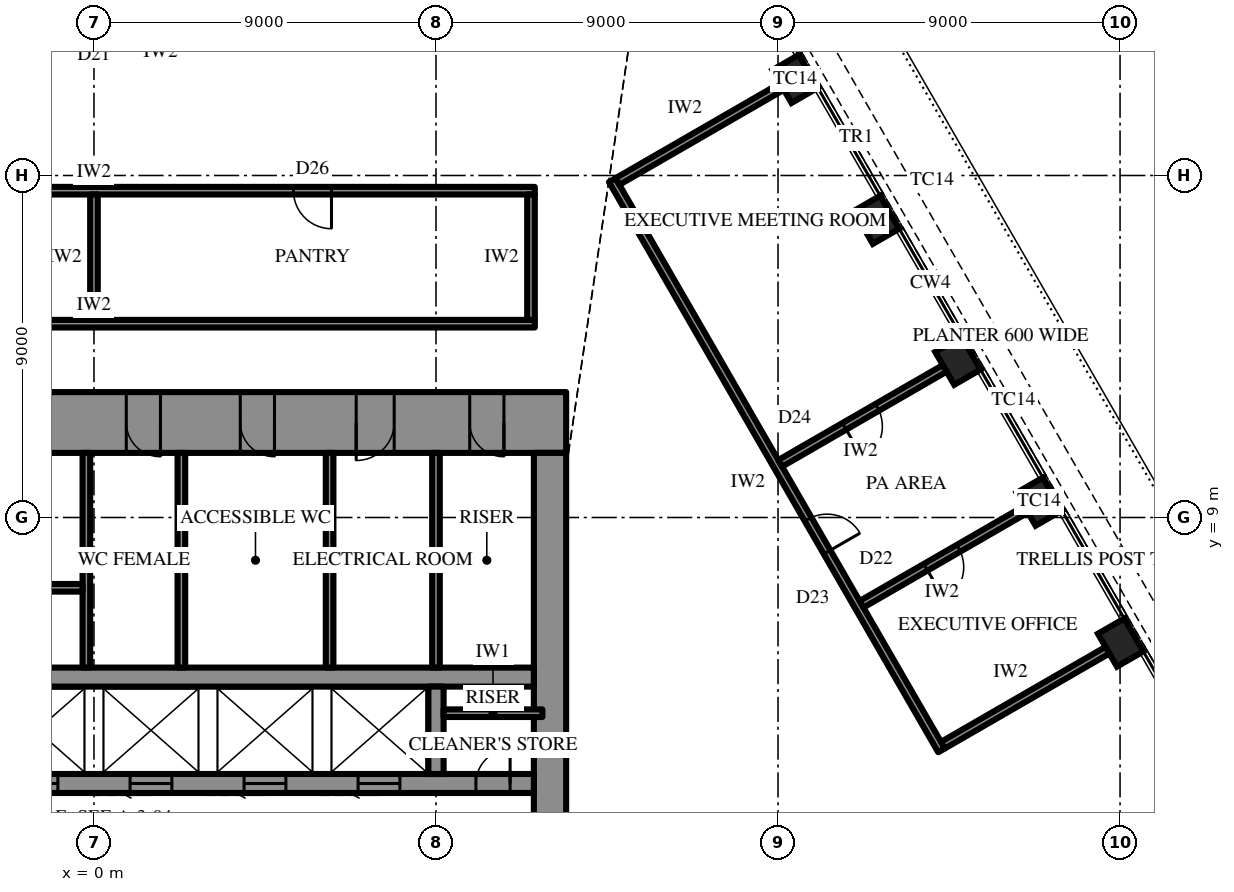
"""IFC4 building model, lengths in metres.
Left out: names, types, materials, properties, quantities, classifications, styles, units other than length and angle.
Written with IfcOpenShell. Run it as: python <this file> out.ifc"""

import sys

from ifc_helpers import new_model, si_unit, direction, frame, frame_2d, origin, origin_2d, place, context, subcontext, project, spatial, rectangle, extrude, element, fill, save


model = new_model("IFC4")
c1 = context("Model", 3, precision=1e-05, world=origin(), true_north=direction((0.0, 1.0)))
c2 = subcontext(c1, "Body", "Model", "MODEL_VIEW")
j1 = project(units=[si_unit("LENGTHUNIT", "METRE"), si_unit("PLANEANGLEUNIT", "RADIAN")], contexts=[c1])
p1 = place(None, origin())
s1 = spatial("IfcSite", under=j1, at=p1, CompositionType="ELEMENT")
p2 = place(p1, origin())
s2 = spatial("IfcBuilding", under=s1, at=p2, CompositionType="ELEMENT")
p3 = place(p2, frame((0.0, 0.0, 345.1)))
s3 = spatial("IfcBuildingStorey", under=s2, at=p3, CompositionType="ELEMENT", Elevation=345.1)
for number, where, z_axis, x_axis in (
    (1, (27.015, 5.708, 0.0), (0.0, 0.0, 1.0), (-0.5, 0.866, 0.0)),
    (2, (24.874, 9.417, 0.0), (0.0, 0.0, 1.0), (-0.5, 0.866, 0.0)),
    (3, (22.733, 13.125, 0.0), (0.0, 0.0, 1.0), (-0.5, 0.866, 0.0)),
    (4, (20.592, 16.833, 0.0), (0.0, 0.0, 1.0), (-0.5, 0.866, 0.0)),
    (5, (18.451, 20.542, 0.0), (0.0, 0.0, 1.0), (-0.5, 0.866, 0.0)),
):
    element("IfcColumn", number, at=place(p3, frame(where, z_axis=z_axis, x_axis=x_axis)), inside=s3, PredefinedType="COLUMN", context=c2, shape_type="SweptSolid", body=[
        extrude(rectangle(XDim=1.0, YDim=0.8, at=origin_2d()), origin(), (0.0, 0.0, 1.0), 4.2),
    ])
p4 = place(p3, frame((-12.425, 11.5, 0.0), z_axis=(0.0, 0.0, 1.0), x_axis=(1.0, 0.0, 0.0)))
e6 = element("IfcWall", 6, at=p4, inside=s3, PredefinedType="SHEAR", context=c2, shape_type="SweptSolid", body=[
    extrude(rectangle(XDim=24.85, YDim=1.6, at=frame_2d((12.425, 0.0))), origin(), (0.0, 0.0, 1.0), 4.2),
])
p5 = place(p4, frame((13.275, 0.0, 0.0)))
e7 = element("IfcOpeningElement", 7, at=p5, cuts=e6, PredefinedType="OPENING", context=c2, shape_type="SweptSolid", body=[
    extrude(rectangle(XDim=0.9, YDim=2.2, at=frame_2d((0.45, 1.1))), frame((0.0, 0.81, 0.0), z_axis=(0.0, -1.0, 0.0), x_axis=(1.0, 0.0, 0.0)), (0.0, 0.0, 1.0), 1.62),
])
p6 = place(p4, frame((16.275, 0.0, 0.0)))
e8 = element("IfcOpeningElement", 8, at=p6, cuts=e6, PredefinedType="OPENING", context=c2, shape_type="SweptSolid", body=[
    extrude(rectangle(XDim=0.9, YDim=2.2, at=frame_2d((0.45, 1.1))), frame((0.0, 0.81, 0.0), z_axis=(0.0, -1.0, 0.0), x_axis=(1.0, 0.0, 0.0)), (0.0, 0.0, 1.0), 1.62),
])
p7 = place(p4, frame((19.325, 0.0, 0.0)))
e9 = element("IfcOpeningElement", 9, at=p7, cuts=e6, PredefinedType="OPENING", context=c2, shape_type="SweptSolid", body=[
    extrude(rectangle(XDim=1.0, YDim=2.2, at=frame_2d((0.5, 1.1))), frame((0.0, 0.81, 0.0), z_axis=(0.0, -1.0, 0.0), x_axis=(1.0, 0.0, 0.0)), (0.0, 0.0, 1.0), 1.62),
])
p8 = place(p4, frame((1.637, 0.0, 0.0)))
e10 = element("IfcOpeningElement", 10, at=p8, cuts=e6, PredefinedType="OPENING", context=c2, shape_type="SweptSolid", body=[
    extrude(rectangle(XDim=0.9, YDim=2.2, at=frame_2d((0.45, 1.1))), frame((0.0, 0.81, 0.0), z_axis=(0.0, -1.0, 0.0), x_axis=(1.0, 0.0, 0.0)), (0.0, 0.0, 1.0), 1.62),
])
p9 = place(p4, frame((22.312, 0.0, 0.0)))
e11 = element("IfcOpeningElement", 11, at=p9, cuts=e6, PredefinedType="OPENING", context=c2, shape_type="SweptSolid", body=[
    extrude(rectangle(XDim=0.9, YDim=2.2, at=frame_2d((0.45, 1.1))), frame((0.0, 0.81, 0.0), z_axis=(0.0, -1.0, 0.0), x_axis=(1.0, 0.0, 0.0)), (0.0, 0.0, 1.0), 1.62),
])
p10 = place(p3, frame((12.0, -10.7, 0.0), z_axis=(0.0, 0.0, 1.0), x_axis=(0.0, 1.0, 0.0)))
e12 = element("IfcWall", 12, at=p10, inside=s3, PredefinedType="SHEAR", context=c2, shape_type="SweptSolid", body=[
    extrude(rectangle(XDim=21.4, YDim=0.85, at=frame_2d((10.7, 0.0))), origin(), (0.0, 0.0, 1.0), 4.2),
])
p11 = place(p10, frame((9.8, 0.0, 0.0)))
e13 = element("IfcOpeningElement", 13, at=p11, cuts=e12, PredefinedType="OPENING", context=c2, shape_type="SweptSolid", body=[
    extrude(rectangle(XDim=1.8, YDim=2.4, at=frame_2d((0.9, 1.2))), frame((0.0, 0.435, 0.0), z_axis=(0.0, -1.0, 0.0), x_axis=(1.0, 0.0, 0.0)), (0.0, 0.0, 1.0), 0.87),
])
p12 = place(p3, frame((-3.2, 2.0, 0.0), z_axis=(0.0, 0.0, 1.0), x_axis=(1.0, 0.0, 0.0)))
e14 = element("IfcWall", 14, at=p12, inside=s3, PredefinedType="SHEAR", context=c2, shape_type="SweptSolid", body=[
    extrude(rectangle(XDim=14.775, YDim=0.5, at=frame_2d((7.387, 0.0))), origin(), (0.0, 0.0, 1.0), 4.2),
])
p13 = place(p12, frame((13.25, 0.0, 0.0)))
e15 = element("IfcOpeningElement", 15, at=p13, cuts=e14, PredefinedType="OPENING", context=c2, shape_type="SweptSolid", body=[
    extrude(rectangle(XDim=0.9, YDim=2.2, at=frame_2d((0.45, 1.1))), frame((0.0, 0.26, 0.0), z_axis=(0.0, -1.0, 0.0), x_axis=(1.0, 0.0, 0.0)), (0.0, 0.0, 1.0), 0.52),
])
p14 = place(p12, frame((1.15, 0.0, 0.0)))
e16 = element("IfcOpeningElement", 16, at=p14, cuts=e14, PredefinedType="OPENING", context=c2, shape_type="SweptSolid", body=[
    extrude(rectangle(XDim=1.1, YDim=2.2, at=frame_2d((0.55, 1.1))), frame((0.0, 0.26, 0.0), z_axis=(0.0, -1.0, 0.0), x_axis=(1.0, 0.0, 0.0)), (0.0, 0.0, 1.0), 0.52),
])
p15 = place(p12, frame((4.15, 0.0, 0.0)))
e17 = element("IfcOpeningElement", 17, at=p15, cuts=e14, PredefinedType="OPENING", context=c2, shape_type="SweptSolid", body=[
    extrude(rectangle(XDim=1.1, YDim=2.2, at=frame_2d((0.55, 1.1))), frame((0.0, 0.26, 0.0), z_axis=(0.0, -1.0, 0.0), x_axis=(1.0, 0.0, 0.0)), (0.0, 0.0, 1.0), 0.52),
])
p16 = place(p12, frame((7.15, 0.0, 0.0)))
e18 = element("IfcOpeningElement", 18, at=p16, cuts=e14, PredefinedType="OPENING", context=c2, shape_type="SweptSolid", body=[
    extrude(rectangle(XDim=1.1, YDim=2.2, at=frame_2d((0.55, 1.1))), frame((0.0, 0.26, 0.0), z_axis=(0.0, -1.0, 0.0), x_axis=(1.0, 0.0, 0.0)), (0.0, 0.0, 1.0), 0.52),
])
p17 = place(p12, frame((10.15, 0.0, 0.0)))
e19 = element("IfcOpeningElement", 19, at=p17, cuts=e14, PredefinedType="OPENING", context=c2, shape_type="SweptSolid", body=[
    extrude(rectangle(XDim=1.1, YDim=2.2, at=frame_2d((0.55, 1.1))), frame((0.0, 0.26, 0.0), z_axis=(0.0, -1.0, 0.0), x_axis=(1.0, 0.0, 0.0)), (0.0, 0.0, 1.0), 0.52),
])
p18 = place(p3, frame((-11.575, 4.8, 0.0), z_axis=(0.0, 0.0, 1.0), x_axis=(1.0, 0.0, 0.0)))
e20 = element("IfcWall", 20, at=p18, inside=s3, PredefinedType="SHEAR", context=c2, shape_type="SweptSolid", body=[
    extrude(rectangle(XDim=23.15, YDim=0.5, at=frame_2d((11.575, 0.0))), origin(), (0.0, 0.0, 1.0), 4.2),
])
p19 = place(p18, frame((6.475, 0.0, 0.0)))
e21 = element("IfcOpeningElement", 21, at=p19, cuts=e20, PredefinedType="OPENING", context=c2, shape_type="SweptSolid", body=[
    extrude(rectangle(XDim=1.2, YDim=2.2, at=frame_2d((0.6, 1.1))), frame((0.0, 0.26, 0.0), z_axis=(0.0, -1.0, 0.0), x_axis=(1.0, 0.0, 0.0)), (0.0, 0.0, 1.0), 0.52),
])
p20 = place(p18, frame((3.475, 0.0, 0.0)))
e22 = element("IfcOpeningElement", 22, at=p20, cuts=e20, PredefinedType="OPENING", context=c2, shape_type="SweptSolid", body=[
    extrude(rectangle(XDim=1.2, YDim=2.2, at=frame_2d((0.6, 1.1))), frame((0.0, 0.26, 0.0), z_axis=(0.0, -1.0, 0.0), x_axis=(1.0, 0.0, 0.0)), (0.0, 0.0, 1.0), 0.52),
])
p21 = place(p3, frame((9.0, 2.25, 0.0), z_axis=(0.0, 0.0, 1.0), x_axis=(0.0, 1.0, 0.0)))
e23 = element("IfcWall", 23, at=p21, inside=s3, PredefinedType="SHEAR", context=c2, shape_type="SweptSolid", body=[
    extrude(rectangle(XDim=2.3, YDim=0.4, at=frame_2d((1.15, 0.0))), origin(), (0.0, 0.0, 1.0), 4.2),
])
p22 = place(p3, frame((-0.2, 5.05, 0.0), z_axis=(0.0, 0.0, 1.0), x_axis=(0.0, 1.0, 0.0)))
e24 = element("IfcWall", 24, at=p22, inside=s3, PredefinedType="SHEAR", context=c2, shape_type="SweptSolid", body=[
    extrude(rectangle(XDim=5.65, YDim=0.2, at=frame_2d((2.825, 0.0))), origin(), (0.0, 0.0, 1.0), 4.2),
])
p23 = place(p3, frame((-8.9, 7.15, 0.0), z_axis=(0.0, 0.0, 1.0), x_axis=(1.0, 0.0, 0.0)))
e25 = element("IfcWall", 25, at=p23, inside=s3, PredefinedType="SHEAR", context=c2, shape_type="SweptSolid", body=[
    extrude(rectangle(XDim=8.6, YDim=0.2, at=frame_2d((4.3, 0.0))), origin(), (0.0, 0.0, 1.0), 4.2),
])
p24 = place(p23, frame((0.3, 0.0, 0.0)))
e26 = element("IfcOpeningElement", 26, at=p24, cuts=e25, PredefinedType="OPENING", context=c2, shape_type="SweptSolid", body=[
    extrude(rectangle(XDim=1.0, YDim=2.2, at=frame_2d((0.5, 1.1))), frame((0.0, 0.11, 0.0), z_axis=(0.0, -1.0, 0.0), x_axis=(1.0, 0.0, 0.0)), (0.0, 0.0, 1.0), 0.22),
])
for number, where, z_axis, x_axis in (
    (27, (9.0, 5.05, 0.0), (0.0, 0.0, 1.0), (0.0, 1.0, 0.0)),
    (28, (2.3, 5.05, 0.0), (0.0, 0.0, 1.0), (0.0, 1.0, 0.0)),
    (29, (6.2, 5.05, 0.0), (0.0, 0.0, 1.0), (0.0, 1.0, 0.0)),
):
    element("IfcWall", number, at=place(p3, frame(where, z_axis=z_axis, x_axis=x_axis)), inside=s3, PredefinedType="PARTITIONING", context=c2, shape_type="SweptSolid", body=[
        extrude(rectangle(XDim=5.65, YDim=0.2, at=frame_2d((2.825, 0.0))), origin(), (0.0, 0.0, 1.0), 4.0),
    ])
p25 = place(p3, frame((9.2, 3.85, 0.0), z_axis=(0.0, 0.0, 1.0), x_axis=(1.0, 0.0, 0.0)))
e30 = element("IfcWall", 30, at=p25, inside=s3, PredefinedType="PARTITIONING", context=c2, shape_type="SweptSolid", body=[
    extrude(rectangle(XDim=2.6, YDim=0.2, at=frame_2d((1.3, 0.0))), origin(), (0.0, 0.0, 1.0), 4.0),
])
p26 = place(p3, frame((-11.6, 14.1, 0.0), z_axis=(0.0, 0.0, 1.0), x_axis=(1.0, 0.0, 0.0)))
e31 = element("IfcWall", 31, at=p26, inside=s3, PredefinedType="PARTITIONING", context=c2, shape_type="SweptSolid", body=[
    extrude(rectangle(XDim=23.2, YDim=0.2, at=frame_2d((11.6, 0.0))), origin(), (0.0, 0.0, 1.0), 4.0),
])
p27 = place(p3, frame((-11.6, 17.6, 0.0), z_axis=(0.0, 0.0, 1.0), x_axis=(1.0, 0.0, 0.0)))
e32 = element("IfcWall", 32, at=p27, inside=s3, PredefinedType="PARTITIONING", context=c2, shape_type="SweptSolid", body=[
    extrude(rectangle(XDim=23.2, YDim=0.2, at=frame_2d((11.6, 0.0))), origin(), (0.0, 0.0, 1.0), 4.0),
])
p28 = place(p27, frame((5.35, 0.0, 0.0)))
e33 = element("IfcOpeningElement", 33, at=p28, cuts=e32, PredefinedType="OPENING", context=c2, shape_type="SweptSolid", body=[
    extrude(rectangle(XDim=1.0, YDim=2.2, at=frame_2d((0.5, 1.1))), frame((0.0, 0.11, 0.0), z_axis=(0.0, -1.0, 0.0), x_axis=(1.0, 0.0, 0.0)), (0.0, 0.0, 1.0), 0.22),
])
p29 = place(p27, frame((16.85, 0.0, 0.0)))
e34 = element("IfcOpeningElement", 34, at=p29, cuts=e32, PredefinedType="OPENING", context=c2, shape_type="SweptSolid", body=[
    extrude(rectangle(XDim=1.0, YDim=2.2, at=frame_2d((0.5, 1.1))), frame((0.0, 0.11, 0.0), z_axis=(0.0, -1.0, 0.0), x_axis=(1.0, 0.0, 0.0)), (0.0, 0.0, 1.0), 0.22),
])
p30 = place(p3, frame((0.0, 14.2, 0.0), z_axis=(0.0, 0.0, 1.0), x_axis=(0.0, 1.0, 0.0)))
e35 = element("IfcWall", 35, at=p30, inside=s3, PredefinedType="PARTITIONING", context=c2, shape_type="SweptSolid", body=[
    extrude(rectangle(XDim=3.3, YDim=0.2, at=frame_2d((1.65, 0.0))), origin(), (0.0, 0.0, 1.0), 2.992),
])
p31 = place(p3, frame((11.5, 14.2, 0.0), z_axis=(0.0, 0.0, 1.0), x_axis=(0.0, 1.0, 0.0)))
e36 = element("IfcWall", 36, at=p31, inside=s3, PredefinedType="PARTITIONING", context=c2, shape_type="SweptSolid", body=[
    extrude(rectangle(XDim=3.3, YDim=0.2, at=frame_2d((1.65, 0.0))), origin(), (0.0, 0.0, 1.0), 4.0),
])
p32 = place(p3, frame((22.302, 2.872, 0.0), z_axis=(0.0, 0.0, 1.0), x_axis=(-0.500006217173, 0.866021814268, 0.0)))
e37 = element("IfcWall", 37, at=p32, inside=s3, PredefinedType="PARTITIONING", context=c2, shape_type="SweptSolid", body=[
    extrude(rectangle(XDim=17.328, YDim=0.2, at=frame_2d((8.664, 0.0))), origin(), (0.0, 0.0, 1.0), 4.0),
])
p33 = place(p32, frame((6.023, 0.0, 0.0)))
e38 = element("IfcOpeningElement", 38, at=p33, cuts=e37, PredefinedType="OPENING", context=c2, shape_type="SweptSolid", body=[
    extrude(rectangle(XDim=1.0, YDim=2.2, at=frame_2d((0.5, 1.1))), frame((0.0, 0.11, 0.0), z_axis=(0.0, -1.0, 0.0), x_axis=(1.0, 0.0, 0.0)), (0.0, 0.0, 1.0), 0.22),
])
p34 = place(p3, frame((22.339, 3.008, 0.0), z_axis=(0.0, 0.0, 1.0), x_axis=(0.866022959057, 0.500004234368, 0.0)))
e39 = element("IfcWall", 39, at=p34, inside=s3, PredefinedType="PARTITIONING", context=c2, shape_type="SweptSolid", body=[
    extrude(rectangle(XDim=5.0, YDim=0.2, at=frame_2d((2.5, 0.0))), origin(), (0.0, 0.0, 1.0), 3.082),
])
p35 = place(p3, frame((20.198, 6.717, 0.0), z_axis=(0.0, 0.0, 1.0), x_axis=(0.866022959057, 0.500004234368, 0.0)))
e40 = element("IfcWall", 40, at=p35, inside=s3, PredefinedType="PARTITIONING", context=c2, shape_type="SweptSolid", body=[
    extrude(rectangle(XDim=5.0, YDim=0.2, at=frame_2d((2.5, 0.0))), origin(), (0.0, 0.0, 1.0), 2.992),
])
p36 = place(p35, frame((1.95, 0.0, 0.0)))
e41 = element("IfcOpeningElement", 41, at=p36, cuts=e40, PredefinedType="OPENING", context=c2, shape_type="SweptSolid", body=[
    extrude(rectangle(XDim=1.0, YDim=2.2, at=frame_2d((0.5, 1.1))), frame((0.0, 0.11, 0.0), z_axis=(0.0, -1.0, 0.0), x_axis=(1.0, 0.0, 0.0)), (0.0, 0.0, 1.0), 0.22),
])
p37 = place(p3, frame((18.057, 10.425, 0.0), z_axis=(0.0, 0.0, 1.0), x_axis=(0.866022959057, 0.500004234368, 0.0)))
e42 = element("IfcWall", 42, at=p37, inside=s3, PredefinedType="PARTITIONING", context=c2, shape_type="SweptSolid", body=[
    extrude(rectangle(XDim=5.0, YDim=0.2, at=frame_2d((2.5, 0.0))), origin(), (0.0, 0.0, 1.0), 3.082),
])
p38 = place(p37, frame((1.95, 0.0, 0.0)))
e43 = element("IfcOpeningElement", 43, at=p38, cuts=e42, PredefinedType="OPENING", context=c2, shape_type="SweptSolid", body=[
    extrude(rectangle(XDim=1.0, YDim=2.2, at=frame_2d((0.5, 1.1))), frame((0.0, 0.11, 0.0), z_axis=(0.0, -1.0, 0.0), x_axis=(1.0, 0.0, 0.0)), (0.0, 0.0, 1.0), 0.22),
])
p39 = place(p3, frame((13.775, 17.842, 0.0), z_axis=(0.0, 0.0, 1.0), x_axis=(0.866022959057, 0.500004234368, 0.0)))
e44 = element("IfcWall", 44, at=p39, inside=s3, PredefinedType="PARTITIONING", context=c2, shape_type="SweptSolid", body=[
    extrude(rectangle(XDim=5.0, YDim=0.2, at=frame_2d((2.5, 0.0))), origin(), (0.0, 0.0, 1.0), 3.082),
])
p40 = place(p5, frame((0.9, 0.0, 0.0), z_axis=(0.0, 0.0, 1.0), x_axis=(-1.0, 0.0, 0.0)))
e45 = element("IfcDoor", 45, at=p40, inside=s3, OperationType="SINGLE_SWING_RIGHT", PredefinedType="DOOR", context=c2, shape_type="SweptSolid", body=[
    extrude(rectangle(XDim=0.9, YDim=2.2, at=frame_2d((0.45, 1.1))), frame((0.0, 0.025, 0.0), z_axis=(0.0, -1.0, 0.0), x_axis=(1.0, 0.0, 0.0)), (0.0, 0.0, 1.0), 0.05),
])
fill(e7, e45)
p41 = place(p6, frame((0.9, 0.0, 0.0), z_axis=(0.0, 0.0, 1.0), x_axis=(-1.0, 0.0, 0.0)))
e46 = element("IfcDoor", 46, at=p41, inside=s3, OperationType="SINGLE_SWING_RIGHT", PredefinedType="DOOR", context=c2, shape_type="SweptSolid", body=[
    extrude(rectangle(XDim=0.9, YDim=2.2, at=frame_2d((0.45, 1.1))), frame((0.0, 0.025, 0.0), z_axis=(0.0, -1.0, 0.0), x_axis=(1.0, 0.0, 0.0)), (0.0, 0.0, 1.0), 0.05),
])
fill(e8, e46)
p42 = place(p7, frame((1.0, 0.0, 0.0), z_axis=(0.0, 0.0, 1.0), x_axis=(-1.0, 0.0, 0.0)))
e47 = element("IfcDoor", 47, at=p42, inside=s3, OperationType="SINGLE_SWING_LEFT", PredefinedType="DOOR", context=c2, shape_type="SweptSolid", body=[
    extrude(rectangle(XDim=1.0, YDim=2.2, at=frame_2d((0.5, 1.1))), frame((0.0, 0.025, 0.0), z_axis=(0.0, -1.0, 0.0), x_axis=(1.0, 0.0, 0.0)), (0.0, 0.0, 1.0), 0.05),
])
fill(e9, e47)
p43 = place(p9, frame((0.9, 0.0, 0.0), z_axis=(0.0, 0.0, 1.0), x_axis=(-1.0, 0.0, 0.0)))
e48 = element("IfcDoor", 48, at=p43, inside=s3, OperationType="SINGLE_SWING_RIGHT", PredefinedType="DOOR", context=c2, shape_type="SweptSolid", body=[
    extrude(rectangle(XDim=0.9, YDim=2.2, at=frame_2d((0.45, 1.1))), frame((0.0, 0.025, 0.0), z_axis=(0.0, -1.0, 0.0), x_axis=(1.0, 0.0, 0.0)), (0.0, 0.0, 1.0), 0.05),
])
fill(e11, e48)
p44 = place(p13, origin())
e49 = element("IfcDoor", 49, at=p44, inside=s3, OperationType="SINGLE_SWING_LEFT", PredefinedType="DOOR", context=c2, shape_type="SweptSolid", body=[
    extrude(rectangle(XDim=0.9, YDim=2.2, at=frame_2d((0.45, 1.1))), frame((0.0, 0.025, 0.0), z_axis=(0.0, -1.0, 0.0), x_axis=(1.0, 0.0, 0.0)), (0.0, 0.0, 1.0), 0.05),
])
fill(e15, e49)
p45 = place(p14, frame((1.1, 0.0, 0.0), z_axis=(0.0, 0.0, 1.0), x_axis=(-1.0, 0.0, 0.0)))
e50 = element("IfcDoor", 50, at=p45, inside=s3, OperationType="SLIDING_TO_LEFT", PredefinedType="DOOR", context=c2, shape_type="SweptSolid", body=[
    extrude(rectangle(XDim=1.1, YDim=2.2, at=frame_2d((0.55, 1.1))), frame((0.0, 0.025, 0.0), z_axis=(0.0, -1.0, 0.0), x_axis=(1.0, 0.0, 0.0)), (0.0, 0.0, 1.0), 0.05),
])
fill(e16, e50)
p46 = place(p15, frame((1.1, 0.0, 0.0), z_axis=(0.0, 0.0, 1.0), x_axis=(-1.0, 0.0, 0.0)))
e51 = element("IfcDoor", 51, at=p46, inside=s3, OperationType="SLIDING_TO_LEFT", PredefinedType="DOOR", context=c2, shape_type="SweptSolid", body=[
    extrude(rectangle(XDim=1.1, YDim=2.2, at=frame_2d((0.55, 1.1))), frame((0.0, 0.025, 0.0), z_axis=(0.0, -1.0, 0.0), x_axis=(1.0, 0.0, 0.0)), (0.0, 0.0, 1.0), 0.05),
])
fill(e17, e51)
p47 = place(p16, frame((1.1, 0.0, 0.0), z_axis=(0.0, 0.0, 1.0), x_axis=(-1.0, 0.0, 0.0)))
e52 = element("IfcDoor", 52, at=p47, inside=s3, OperationType="SLIDING_TO_LEFT", PredefinedType="DOOR", context=c2, shape_type="SweptSolid", body=[
    extrude(rectangle(XDim=1.1, YDim=2.2, at=frame_2d((0.55, 1.1))), frame((0.0, 0.025, 0.0), z_axis=(0.0, -1.0, 0.0), x_axis=(1.0, 0.0, 0.0)), (0.0, 0.0, 1.0), 0.05),
])
fill(e18, e52)
p48 = place(p17, frame((1.1, 0.0, 0.0), z_axis=(0.0, 0.0, 1.0), x_axis=(-1.0, 0.0, 0.0)))
e53 = element("IfcDoor", 53, at=p48, inside=s3, OperationType="SLIDING_TO_LEFT", PredefinedType="DOOR", context=c2, shape_type="SweptSolid", body=[
    extrude(rectangle(XDim=1.1, YDim=2.2, at=frame_2d((0.55, 1.1))), frame((0.0, 0.025, 0.0), z_axis=(0.0, -1.0, 0.0), x_axis=(1.0, 0.0, 0.0)), (0.0, 0.0, 1.0), 0.05),
])
fill(e19, e53)
p49 = place(p29, frame((1.0, 0.0, 0.0), z_axis=(0.0, 0.0, 1.0), x_axis=(-1.0, 0.0, 0.0)))
e54 = element("IfcDoor", 54, at=p49, inside=s3, OperationType="SINGLE_SWING_RIGHT", PredefinedType="DOOR", context=c2, shape_type="SweptSolid", body=[
    extrude(rectangle(XDim=1.0, YDim=2.2, at=frame_2d((0.5, 1.1))), frame((0.0, 0.025, 0.0), z_axis=(0.0, -1.0, 0.0), x_axis=(1.0, 0.0, 0.0)), (0.0, 0.0, 1.0), 0.05),
])
fill(e34, e54)
p50 = place(p36, frame((1.0, 0.0, 0.0), z_axis=(0.0, 0.0, 1.0), x_axis=(-1.0, 0.0, 0.0)))
e55 = element("IfcDoor", 55, at=p50, inside=s3, OperationType="SINGLE_SWING_LEFT", PredefinedType="DOOR", context=c2, shape_type="SweptSolid", body=[
    extrude(rectangle(XDim=1.0, YDim=2.2, at=frame_2d((0.5, 1.1))), frame((0.0, 0.025, 0.0), z_axis=(0.0, -1.0, 0.0), x_axis=(1.0, 0.0, 0.0)), (0.0, 0.0, 1.0), 0.05),
])
fill(e41, e55)
p51 = place(p33, frame((1.0, 0.0, 0.0), z_axis=(0.0, 0.0, 1.0), x_axis=(-1.0, 0.0, 0.0)))
e56 = element("IfcDoor", 56, at=p51, inside=s3, OperationType="SINGLE_SWING_LEFT", PredefinedType="DOOR", context=c2, shape_type="SweptSolid", body=[
    extrude(rectangle(XDim=1.0, YDim=2.2, at=frame_2d((0.5, 1.1))), frame((0.0, 0.025, 0.0), z_axis=(0.0, -1.0, 0.0), x_axis=(1.0, 0.0, 0.0)), (0.0, 0.0, 1.0), 0.05),
])
fill(e38, e56)
p52 = place(p38, frame((1.0, 0.0, 0.0), z_axis=(0.0, 0.0, 1.0), x_axis=(-1.0, 0.0, 0.0)))
e57 = element("IfcDoor", 57, at=p52, inside=s3, OperationType="SINGLE_SWING_LEFT", PredefinedType="DOOR", context=c2, shape_type="SweptSolid", body=[
    extrude(rectangle(XDim=1.0, YDim=2.2, at=frame_2d((0.5, 1.1))), frame((0.0, 0.025, 0.0), z_axis=(0.0, -1.0, 0.0), x_axis=(1.0, 0.0, 0.0)), (0.0, 0.0, 1.0), 0.05),
])
fill(e43, e57)
save(model, sys.argv[1])
